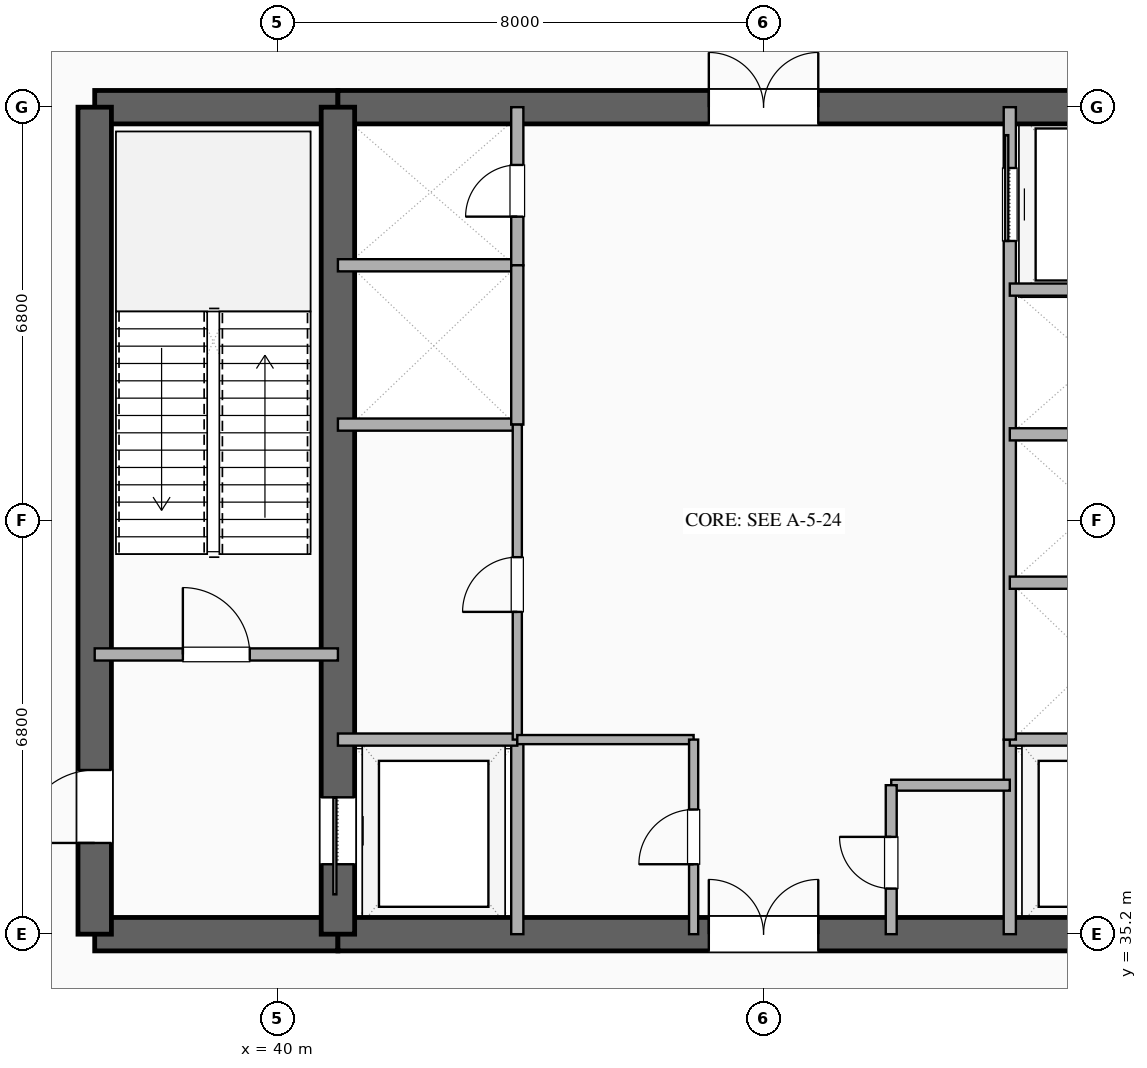
"""IFC4 building model, lengths in metres.
Left out: names, types, materials, properties, quantities, classifications, styles, units other than length and angle.
Written with IfcOpenShell. Run it as: python <this file> out.ifc"""

import sys

from ifc_helpers import new_model, si_unit, direction, frame, frame_2d, origin, place, context, subcontext, project, spatial, rectangle, extrude, element, fill, save


model = new_model("IFC4")
c1 = context("Model", 3, precision=1e-05, world=origin(), true_north=direction((0.0, 1.0)))
c2 = subcontext(c1, "Body", "Model", "MODEL_VIEW")
j1 = project(units=[si_unit("LENGTHUNIT", "METRE"), si_unit("PLANEANGLEUNIT", "RADIAN")], contexts=[c1])
p1 = place(None, origin())
s1 = spatial("IfcSite", under=j1, at=p1, CompositionType="ELEMENT")
p2 = place(p1, origin())
s2 = spatial("IfcBuilding", under=s1, at=p2, CompositionType="ELEMENT")
p3 = place(p2, frame((0.0, 0.0, 145.2)))
s3 = spatial("IfcBuildingStorey", under=s2, at=p3, CompositionType="ELEMENT", Elevation=145.2)
p4 = place(p3, frame((37.0, 35.2, 0.0), z_axis=(0.0, 0.0, 1.0), x_axis=(1.0, 0.0, 0.0)))
e1 = element("IfcWall", 1, at=p4, inside=s3, PredefinedType="SHEAR", context=c2, shape_type="SweptSolid", body=[
    extrude(rectangle(XDim=4.0, YDim=0.55, at=frame_2d((2.0, 0.0))), origin(), (0.0, 0.0, 1.0), 5.15),
])
p5 = place(p3, frame((41.0, 35.2, 0.0), z_axis=(0.0, 0.0, 1.0), x_axis=(1.0, 0.0, 0.0)))
e2 = element("IfcWall", 2, at=p5, inside=s3, PredefinedType="SHEAR", context=c2, shape_type="SweptSolid", body=[
    extrude(rectangle(XDim=14.0, YDim=0.55, at=frame_2d((7.0, 0.0))), origin(), (0.0, 0.0, 1.0), 5.15),
])
p6 = place(p5, frame((6.1, 0.0, 0.0)))
e3 = element("IfcOpeningElement", 3, at=p6, cuts=e2, PredefinedType="OPENING", context=c2, shape_type="SweptSolid", body=[
    extrude(rectangle(XDim=1.8, YDim=2.25, at=frame_2d((0.9, 1.125))), frame((0.0, 0.285, 0.0), z_axis=(0.0, -1.0, 0.0), x_axis=(1.0, 0.0, 0.0)), (0.0, 0.0, 1.0), 0.57),
])
p7 = place(p3, frame((37.0, 48.8, 0.0), z_axis=(0.0, 0.0, 1.0), x_axis=(1.0, 0.0, 0.0)))
e4 = element("IfcWall", 4, at=p7, inside=s3, PredefinedType="SHEAR", context=c2, shape_type="SweptSolid", body=[
    extrude(rectangle(XDim=4.0, YDim=0.55, at=frame_2d((2.0, 0.0))), origin(), (0.0, 0.0, 1.0), 5.15),
])
p8 = place(p3, frame((41.0, 48.8, 0.0), z_axis=(0.0, 0.0, 1.0), x_axis=(1.0, 0.0, 0.0)))
e5 = element("IfcWall", 5, at=p8, inside=s3, PredefinedType="SHEAR", context=c2, shape_type="SweptSolid", body=[
    extrude(rectangle(XDim=14.0, YDim=0.55, at=frame_2d((7.0, 0.0))), origin(), (0.0, 0.0, 1.0), 5.15),
])
p9 = place(p8, frame((6.1, 0.0, 0.0)))
e6 = element("IfcOpeningElement", 6, at=p9, cuts=e5, PredefinedType="OPENING", context=c2, shape_type="SweptSolid", body=[
    extrude(rectangle(XDim=1.8, YDim=2.25, at=frame_2d((0.9, 1.125))), frame((0.0, 0.285, 0.0), z_axis=(0.0, -1.0, 0.0), x_axis=(1.0, 0.0, 0.0)), (0.0, 0.0, 1.0), 0.57),
])
p10 = place(p3, frame((37.0, 35.2, 0.0), z_axis=(0.0, 0.0, 1.0), x_axis=(0.0, 1.0, 0.0)))
e7 = element("IfcWall", 7, at=p10, inside=s3, PredefinedType="SHEAR", context=c2, shape_type="SweptSolid", body=[
    extrude(rectangle(XDim=13.6, YDim=0.55, at=frame_2d((6.8, 0.0))), origin(), (0.0, 0.0, 1.0), 5.15),
])
p11 = place(p10, frame((1.5, 0.0, 0.0)))
e8 = element("IfcOpeningElement", 8, at=p11, cuts=e7, PredefinedType="OPENING", context=c2, shape_type="SweptSolid", body=[
    extrude(rectangle(XDim=1.2, YDim=2.15, at=frame_2d((0.6, 1.075))), frame((0.0, 0.285, 0.0), z_axis=(0.0, -1.0, 0.0), x_axis=(1.0, 0.0, 0.0)), (0.0, 0.0, 1.0), 0.57),
])
p12 = place(p3, frame((41.0, 35.2, 0.0), z_axis=(0.0, 0.0, 1.0), x_axis=(0.0, 1.0, 0.0)))
e9 = element("IfcWall", 9, at=p12, inside=s3, PredefinedType="SHEAR", context=c2, shape_type="SweptSolid", body=[
    extrude(rectangle(XDim=13.6, YDim=0.55, at=frame_2d((6.8, 0.0))), origin(), (0.0, 0.0, 1.0), 5.15),
])
p13 = place(p12, frame((1.15, 0.0, 0.0)))
e10 = element("IfcOpeningElement", 10, at=p13, cuts=e9, PredefinedType="OPENING", context=c2, shape_type="SweptSolid", body=[
    extrude(rectangle(XDim=1.1, YDim=2.2, at=frame_2d((0.55, 1.1))), frame((0.0, 0.285, 0.0), z_axis=(0.0, -1.0, 0.0), x_axis=(1.0, 0.0, 0.0)), (0.0, 0.0, 1.0), 0.57),
])
p14 = place(p3, frame((37.0, 39.8, 0.0), z_axis=(0.0, 0.0, 1.0), x_axis=(1.0, 0.0, 0.0)))
e11 = element("IfcWall", 11, at=p14, inside=s3, PredefinedType="SOLIDWALL", context=c2, shape_type="SweptSolid", body=[
    extrude(rectangle(XDim=4.0, YDim=0.2, at=frame_2d((2.0, 0.0))), origin(), (0.0, 0.0, 1.0), 3.45),
])
p15 = place(p14, frame((1.45, 0.0, 0.0)))
e12 = element("IfcOpeningElement", 12, at=p15, cuts=e11, PredefinedType="OPENING", context=c2, shape_type="SweptSolid", body=[
    extrude(rectangle(XDim=1.1, YDim=2.15, at=frame_2d((0.55, 1.075))), frame((0.0, 0.11, 0.0), z_axis=(0.0, -1.0, 0.0), x_axis=(1.0, 0.0, 0.0)), (0.0, 0.0, 1.0), 0.22),
])
p16 = place(p3, frame((43.95, 35.2, 0.0), z_axis=(0.0, 0.0, 1.0), x_axis=(0.0, 1.0, 0.0)))
e13 = element("IfcWall", 13, at=p16, inside=s3, PredefinedType="SOLIDWALL", context=c2, shape_type="SweptSolid", body=[
    extrude(rectangle(XDim=3.2, YDim=0.2, at=frame_2d((1.6, 0.0))), origin(), (0.0, 0.0, 1.0), 3.45),
])
p17 = place(p3, frame((41.0, 38.4, 0.0), z_axis=(0.0, 0.0, 1.0), x_axis=(1.0, 0.0, 0.0)))
e14 = element("IfcWall", 14, at=p17, inside=s3, PredefinedType="SOLIDWALL", context=c2, shape_type="SweptSolid", body=[
    extrude(rectangle(XDim=2.95, YDim=0.2, at=frame_2d((1.475, 0.0))), origin(), (0.0, 0.0, 1.0), 3.45),
])
p18 = place(p3, frame((52.05, 35.2, 0.0), z_axis=(0.0, 0.0, 1.0), x_axis=(0.0, 1.0, 0.0)))
e15 = element("IfcWall", 15, at=p18, inside=s3, PredefinedType="SOLIDWALL", context=c2, shape_type="SweptSolid", body=[
    extrude(rectangle(XDim=3.2, YDim=0.2, at=frame_2d((1.6, 0.0))), origin(), (0.0, 0.0, 1.0), 3.45),
])
for number, where, z_axis, x_axis in (
    (16, (52.05, 38.4, 0.0), (0.0, 0.0, 1.0), (1.0, 0.0, 0.0)),
    (17, (41.0, 46.2, 0.0), (0.0, 0.0, 1.0), (1.0, 0.0, 0.0)),
):
    element("IfcWall", number, at=place(p3, frame(where, z_axis=z_axis, x_axis=x_axis)), inside=s3, PredefinedType="SOLIDWALL", context=c2, shape_type="SweptSolid", body=[
        extrude(rectangle(XDim=2.95, YDim=0.2, at=frame_2d((1.475, 0.0))), origin(), (0.0, 0.0, 1.0), 3.45),
    ])
p19 = place(p3, frame((43.95, 46.2, 0.0), z_axis=(0.0, 0.0, 1.0), x_axis=(0.0, 1.0, 0.0)))
e18 = element("IfcWall", 18, at=p19, inside=s3, PredefinedType="SOLIDWALL", context=c2, shape_type="SweptSolid", body=[
    extrude(rectangle(XDim=2.6, YDim=0.2, at=frame_2d((1.3, 0.0))), origin(), (0.0, 0.0, 1.0), 3.45),
])
p20 = place(p19, frame((0.8, 0.0, 0.0)))
e19 = element("IfcOpeningElement", 19, at=p20, cuts=e18, PredefinedType="OPENING", context=c2, shape_type="SweptSolid", body=[
    extrude(rectangle(XDim=0.85, YDim=2.15, at=frame_2d((0.425, 1.075))), frame((0.0, 0.11, 0.0), z_axis=(0.0, -1.0, 0.0), x_axis=(1.0, 0.0, 0.0)), (0.0, 0.0, 1.0), 0.22),
])
p21 = place(p3, frame((41.0, 43.58, 0.0), z_axis=(0.0, 0.0, 1.0), x_axis=(1.0, 0.0, 0.0)))
e20 = element("IfcWall", 20, at=p21, inside=s3, PredefinedType="SOLIDWALL", context=c2, shape_type="SweptSolid", body=[
    extrude(rectangle(XDim=2.95, YDim=0.2, at=frame_2d((1.475, 0.0))), origin(), (0.0, 0.0, 1.0), 3.45),
])
p22 = place(p3, frame((43.95, 43.58, 0.0), z_axis=(0.0, 0.0, 1.0), x_axis=(0.0, 1.0, 0.0)))
e21 = element("IfcWall", 21, at=p22, inside=s3, PredefinedType="SOLIDWALL", context=c2, shape_type="SweptSolid", body=[
    extrude(rectangle(XDim=2.62, YDim=0.2, at=frame_2d((1.31, 0.0))), origin(), (0.0, 0.0, 1.0), 3.45),
])
p23 = place(p3, frame((43.95, 38.4, 0.0), z_axis=(0.0, 0.0, 1.0), x_axis=(0.0, 1.0, 0.0)))
e22 = element("IfcWall", 22, at=p23, inside=s3, PredefinedType="PARTITIONING", context=c2, shape_type="SweptSolid", body=[
    extrude(rectangle(XDim=5.18, YDim=0.15, at=frame_2d((2.59, 0.0))), origin(), (0.0, 0.0, 1.0), 3.45),
])
p24 = place(p23, frame((2.1, 0.0, 0.0)))
e23 = element("IfcOpeningElement", 23, at=p24, cuts=e22, PredefinedType="OPENING", context=c2, shape_type="SweptSolid", body=[
    extrude(rectangle(XDim=0.9, YDim=2.15, at=frame_2d((0.45, 1.075))), frame((0.0, 0.085, 0.0), z_axis=(0.0, -1.0, 0.0), x_axis=(1.0, 0.0, 0.0)), (0.0, 0.0, 1.0), 0.17),
])
p25 = place(p3, frame((52.05, 38.4, 0.0), z_axis=(0.0, 0.0, 1.0), x_axis=(0.0, 1.0, 0.0)))
e24 = element("IfcWall", 24, at=p25, inside=s3, PredefinedType="SOLIDWALL", context=c2, shape_type="SweptSolid", body=[
    extrude(rectangle(XDim=10.4, YDim=0.2, at=frame_2d((5.2, 0.0))), origin(), (0.0, 0.0, 1.0), 3.45),
])
p26 = place(p25, frame((8.2, 0.0, 0.0)))
e25 = element("IfcOpeningElement", 25, at=p26, cuts=e24, PredefinedType="OPENING", context=c2, shape_type="SweptSolid", body=[
    extrude(rectangle(XDim=1.2, YDim=2.2, at=frame_2d((0.6, 1.1))), frame((0.0, 0.11, 0.0), z_axis=(0.0, -1.0, 0.0), x_axis=(1.0, 0.0, 0.0)), (0.0, 0.0, 1.0), 0.22),
])
for number, where, z_axis, x_axis in (
    (26, (52.05, 40.98, 0.0), (0.0, 0.0, 1.0), (1.0, 0.0, 0.0)),
    (27, (52.05, 43.42, 0.0), (0.0, 0.0, 1.0), (1.0, 0.0, 0.0)),
    (28, (52.05, 45.8, 0.0), (0.0, 0.0, 1.0), (1.0, 0.0, 0.0)),
):
    element("IfcWall", number, at=place(p3, frame(where, z_axis=z_axis, x_axis=x_axis)), inside=s3, PredefinedType="SOLIDWALL", context=c2, shape_type="SweptSolid", body=[
        extrude(rectangle(XDim=2.95, YDim=0.2, at=frame_2d((1.475, 0.0))), origin(), (0.0, 0.0, 1.0), 3.45),
    ])
p27 = place(p3, frame((43.95, 38.4, 0.0), z_axis=(0.0, 0.0, 1.0), x_axis=(1.0, 0.0, 0.0)))
e29 = element("IfcWall", 29, at=p27, inside=s3, PredefinedType="PARTITIONING", context=c2, shape_type="SweptSolid", body=[
    extrude(rectangle(XDim=2.9, YDim=0.15, at=frame_2d((1.45, 0.0))), origin(), (0.0, 0.0, 1.0), 3.45),
])
p28 = place(p3, frame((46.85, 35.2, 0.0), z_axis=(0.0, 0.0, 1.0), x_axis=(0.0, 1.0, 0.0)))
e30 = element("IfcWall", 30, at=p28, inside=s3, PredefinedType="PARTITIONING", context=c2, shape_type="SweptSolid", body=[
    extrude(rectangle(XDim=3.2, YDim=0.15, at=frame_2d((1.6, 0.0))), origin(), (0.0, 0.0, 1.0), 3.45),
])
p29 = place(p28, frame((1.15, 0.0, 0.0)))
e31 = element("IfcOpeningElement", 31, at=p29, cuts=e30, PredefinedType="OPENING", context=c2, shape_type="SweptSolid", body=[
    extrude(rectangle(XDim=0.9, YDim=2.15, at=frame_2d((0.45, 1.075))), frame((0.0, 0.085, 0.0), z_axis=(0.0, -1.0, 0.0), x_axis=(1.0, 0.0, 0.0)), (0.0, 0.0, 1.0), 0.17),
])
p30 = place(p3, frame((50.1, 37.65, 0.0), z_axis=(0.0, 0.0, 1.0), x_axis=(1.0, 0.0, 0.0)))
e32 = element("IfcWall", 32, at=p30, inside=s3, PredefinedType="PLUMBINGWALL", context=c2, shape_type="SweptSolid", body=[
    extrude(rectangle(XDim=1.95, YDim=0.18, at=frame_2d((0.975, 0.0))), origin(), (0.0, 0.0, 1.0), 3.45),
])
p31 = place(p3, frame((50.1, 35.2, 0.0), z_axis=(0.0, 0.0, 1.0), x_axis=(0.0, 1.0, 0.0)))
e33 = element("IfcWall", 33, at=p31, inside=s3, PredefinedType="PLUMBINGWALL", context=c2, shape_type="SweptSolid", body=[
    extrude(rectangle(XDim=2.45, YDim=0.18, at=frame_2d((1.225, 0.0))), origin(), (0.0, 0.0, 1.0), 3.45),
])
p32 = place(p31, frame((0.75, 0.0, 0.0)))
e34 = element("IfcOpeningElement", 34, at=p32, cuts=e33, PredefinedType="OPENING", context=c2, shape_type="SweptSolid", body=[
    extrude(rectangle(XDim=0.85, YDim=2.1, at=frame_2d((0.425, 1.05))), frame((0.0, 0.1, 0.0), z_axis=(0.0, -1.0, 0.0), x_axis=(1.0, 0.0, 0.0)), (0.0, 0.0, 1.0), 0.2),
])
p33 = place(p13, origin())
e35 = element("IfcDoor", 35, at=p33, inside=s3, OperationType="SLIDING_TO_LEFT", PredefinedType="DOOR", context=c2, shape_type="SweptSolid", body=[
    extrude(rectangle(XDim=1.1, YDim=2.2, at=frame_2d((0.55, 1.1))), frame((0.0, 0.025, 0.0), z_axis=(0.0, -1.0, 0.0), x_axis=(1.0, 0.0, 0.0)), (0.0, 0.0, 1.0), 0.05),
])
fill(e10, e35)
p34 = place(p11, origin())
e36 = element("IfcDoor", 36, at=p34, inside=s3, OperationType="SINGLE_SWING_LEFT", PredefinedType="DOOR", context=c2, shape_type="SweptSolid", body=[
    extrude(rectangle(XDim=1.2, YDim=2.15, at=frame_2d((0.6, 1.075))), frame((0.0, 0.025, 0.0), z_axis=(0.0, -1.0, 0.0), x_axis=(1.0, 0.0, 0.0)), (0.0, 0.0, 1.0), 0.05),
])
fill(e8, e36)
p35 = place(p6, origin())
e37 = element("IfcDoor", 37, at=p35, inside=s3, OperationType="DOUBLE_DOOR_SINGLE_SWING", PredefinedType="DOOR", context=c2, shape_type="SweptSolid", body=[
    extrude(rectangle(XDim=1.8, YDim=2.25, at=frame_2d((0.9, 1.125))), frame((0.0, 0.025, 0.0), z_axis=(0.0, -1.0, 0.0), x_axis=(1.0, 0.0, 0.0)), (0.0, 0.0, 1.0), 0.05),
])
fill(e3, e37)
p36 = place(p9, origin())
e38 = element("IfcDoor", 38, at=p36, inside=s3, OperationType="DOUBLE_DOOR_SINGLE_SWING", PredefinedType="DOOR", context=c2, shape_type="SweptSolid", body=[
    extrude(rectangle(XDim=1.8, YDim=2.25, at=frame_2d((0.9, 1.125))), frame((0.0, 0.025, 0.0), z_axis=(0.0, -1.0, 0.0), x_axis=(1.0, 0.0, 0.0)), (0.0, 0.0, 1.0), 0.05),
])
fill(e6, e38)
p37 = place(p15, origin())
e39 = element("IfcDoor", 39, at=p37, inside=s3, OperationType="SINGLE_SWING_LEFT", PredefinedType="DOOR", context=c2, shape_type="SweptSolid", body=[
    extrude(rectangle(XDim=1.1, YDim=2.15, at=frame_2d((0.55, 1.075))), frame((0.0, 0.025, 0.0), z_axis=(0.0, -1.0, 0.0), x_axis=(1.0, 0.0, 0.0)), (0.0, 0.0, 1.0), 0.05),
])
fill(e12, e39)
p38 = place(p20, origin())
e40 = element("IfcDoor", 40, at=p38, inside=s3, OperationType="SINGLE_SWING_LEFT", PredefinedType="DOOR", context=c2, shape_type="SweptSolid", body=[
    extrude(rectangle(XDim=0.85, YDim=2.15, at=frame_2d((0.425, 1.075))), frame((0.0, 0.025, 0.0), z_axis=(0.0, -1.0, 0.0), x_axis=(1.0, 0.0, 0.0)), (0.0, 0.0, 1.0), 0.05),
])
fill(e19, e40)
p39 = place(p24, origin())
e41 = element("IfcDoor", 41, at=p39, inside=s3, OperationType="SINGLE_SWING_LEFT", PredefinedType="DOOR", context=c2, shape_type="SweptSolid", body=[
    extrude(rectangle(XDim=0.9, YDim=2.15, at=frame_2d((0.45, 1.075))), frame((0.0, 0.025, 0.0), z_axis=(0.0, -1.0, 0.0), x_axis=(1.0, 0.0, 0.0)), (0.0, 0.0, 1.0), 0.05),
])
fill(e23, e41)
p40 = place(p26, origin())
e42 = element("IfcDoor", 42, at=p40, inside=s3, OperationType="SLIDING_TO_RIGHT", PredefinedType="DOOR", context=c2, shape_type="SweptSolid", body=[
    extrude(rectangle(XDim=1.2, YDim=2.2, at=frame_2d((0.6, 1.1))), frame((0.0, 0.025, 0.0), z_axis=(0.0, -1.0, 0.0), x_axis=(1.0, 0.0, 0.0)), (0.0, 0.0, 1.0), 0.05),
])
fill(e25, e42)
p41 = place(p29, origin())
e43 = element("IfcDoor", 43, at=p41, inside=s3, OperationType="SINGLE_SWING_LEFT", PredefinedType="DOOR", context=c2, shape_type="SweptSolid", body=[
    extrude(rectangle(XDim=0.9, YDim=2.15, at=frame_2d((0.45, 1.075))), frame((0.0, 0.025, 0.0), z_axis=(0.0, -1.0, 0.0), x_axis=(1.0, 0.0, 0.0)), (0.0, 0.0, 1.0), 0.05),
])
fill(e31, e43)
p42 = place(p32, origin())
e44 = element("IfcDoor", 44, at=p42, inside=s3, OperationType="SINGLE_SWING_RIGHT", PredefinedType="DOOR", context=c2, shape_type="SweptSolid", body=[
    extrude(rectangle(XDim=0.85, YDim=2.1, at=frame_2d((0.425, 1.05))), frame((0.0, 0.025, 0.0), z_axis=(0.0, -1.0, 0.0), x_axis=(1.0, 0.0, 0.0)), (0.0, 0.0, 1.0), 0.05),
])
fill(e34, e44)
save(model, sys.argv[1])
